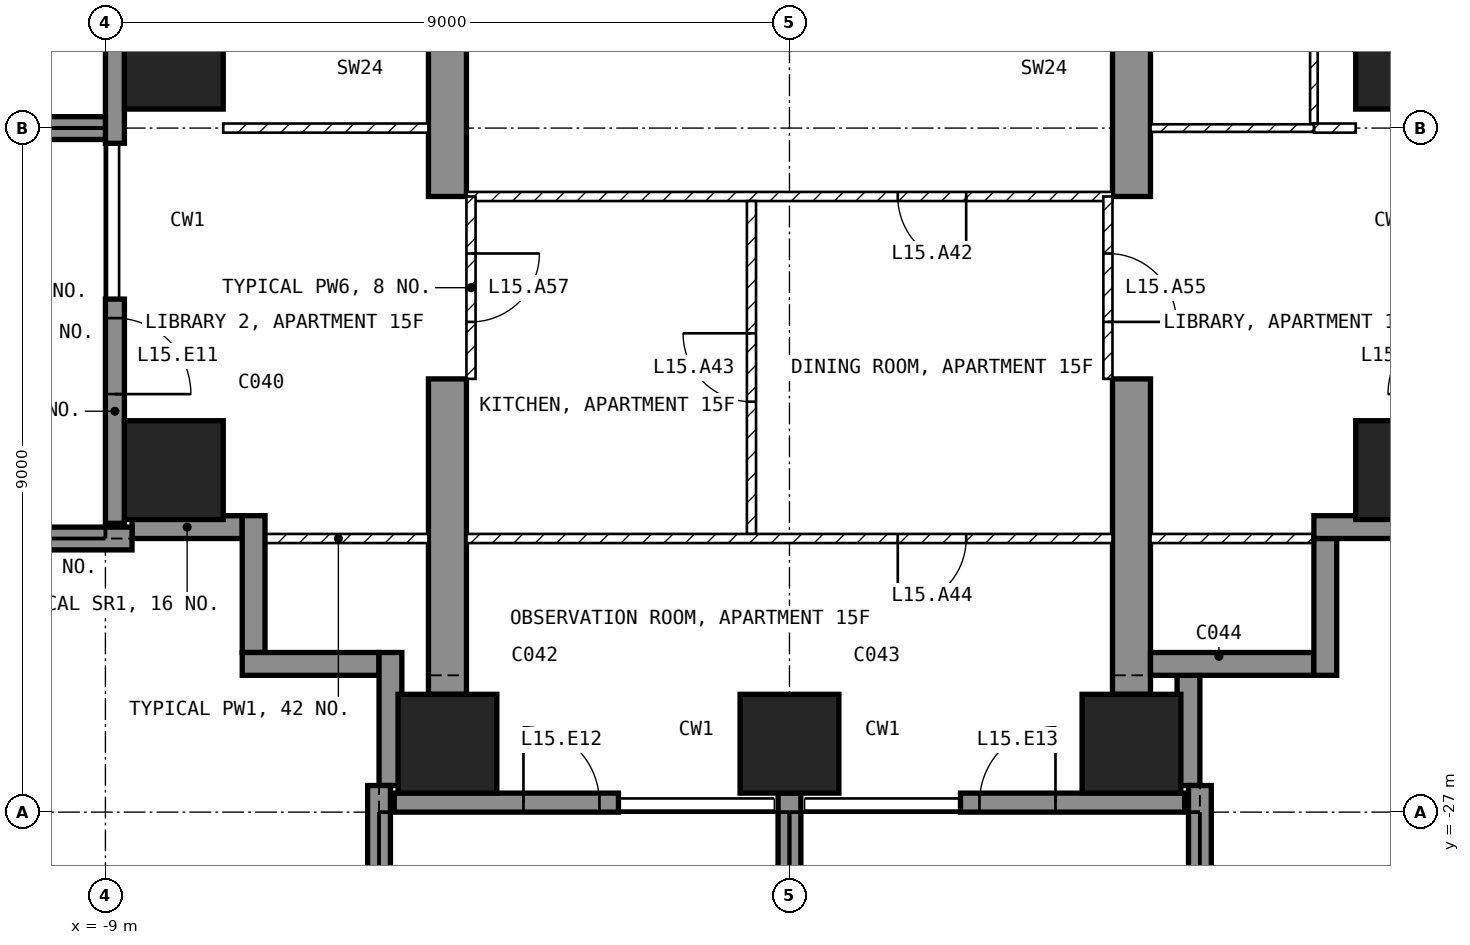
"""IFC4 building model, lengths in metres.
Left out: names, types, materials, properties, quantities, classifications, styles, units other than length and angle.
Written with IfcOpenShell. Run it as: python <this file> out.ifc"""

import sys

from ifc_helpers import new_model, si_unit, direction, frame, frame_2d, origin, origin_2d, place, context, subcontext, project, spatial, polyline, rectangle, outline, extrude, element, fill, save


model = new_model("IFC4")
c1 = context("Model", 3, precision=1e-05, world=origin(), true_north=direction((0.0, 1.0)))
c2 = subcontext(c1, "Body", "Model", "MODEL_VIEW")
j1 = project(units=[si_unit("LENGTHUNIT", "METRE"), si_unit("PLANEANGLEUNIT", "RADIAN")], contexts=[c1])
p1 = place(None, origin())
s1 = spatial("IfcSite", under=j1, at=p1, CompositionType="ELEMENT")
p2 = place(p1, origin())
s2 = spatial("IfcBuilding", under=s1, at=p2, CompositionType="ELEMENT")
p3 = place(p2, frame((0.0, 0.0, 71.5)))
s3 = spatial("IfcBuildingStorey", under=s2, at=p3, CompositionType="ELEMENT", Elevation=71.5)
for number, where, z_axis, x_axis in (
    (1, (-8.1, -22.5, -0.25), (0.0, 0.0, 1.0), (1.0, 0.0, 0.0)),
    (2, (-8.1, -17.1, -0.25), (0.0, 0.0, 1.0), (1.0, 0.0, 0.0)),
    (3, (-4.5, -26.1, -0.25), (0.0, 0.0, 1.0), (1.0, 0.0, 0.0)),
    (4, (0.0, -26.1, -0.25), (0.0, 0.0, 1.0), (1.0, 0.0, 0.0)),
    (5, (4.5, -26.1, -0.25), (0.0, 0.0, 1.0), (1.0, 0.0, 0.0)),
    (6, (8.1, -22.5, -0.25), (0.0, 0.0, 1.0), (1.0, 0.0, 0.0)),
    (7, (8.1, -17.1, -0.25), (0.0, 0.0, 1.0), (1.0, 0.0, 0.0)),
):
    element("IfcColumn", number, at=place(p3, frame(where, z_axis=z_axis, x_axis=x_axis)), inside=s3, PredefinedType="COLUMN", context=c2, shape_type="SweptSolid", body=[
        extrude(rectangle(XDim=1.3, YDim=1.3, at=origin_2d()), origin(), (0.0, 0.0, 1.0), 3.5),
    ])
for number, where, z_axis, x_axis in (
    (8, (-4.75, -25.45, -0.25), (1.0, 0.0, 0.0), (0.0, 1.0, 0.0)),
    (9, (4.25, -25.45, -0.25), (1.0, 0.0, 0.0), (0.0, 1.0, 0.0)),
):
    element("IfcWall", number, at=place(p3, frame(where, z_axis=z_axis, x_axis=x_axis)), inside=s3, PredefinedType="SHEAR", context=c2, shape_type="SweptSolid", body=[
        extrude(outline(polyline([(0.0, 0.0), (4.15, 0.0), (4.15, 2.65), (6.55, 2.65), (6.55, 0.0), (11.95, 0.0), (11.95, 2.65), (14.35, 2.65), (14.35, 0.0), (16.45, 0.0), (16.45, 3.5), (0.0, 3.5), (0.0, 0.0)])), origin(), (0.0, 0.0, 1.0), 0.5),
    ])
p4 = place(p3, frame((-8.875, -14.65, 0.0), z_axis=(0.0, 0.0, 1.0), x_axis=(0.0, -1.0, 0.0)))
e10 = element("IfcWall", 10, at=p4, inside=s3, PredefinedType="SOLIDWALL", context=c2, shape_type="SweptSolid", body=[
    extrude(rectangle(XDim=3.55, YDim=0.25, at=frame_2d((1.775, 0.0))), origin(), (0.0, 0.0, 1.0), 3.25),
])
p5 = place(p4, frame((0.25, 0.0, 0.0)))
e11 = element("IfcOpeningElement", 11, at=p5, cuts=e10, PredefinedType="OPENING", context=c2, shape_type="SweptSolid", body=[
    extrude(rectangle(XDim=1.2, YDim=2.4, at=frame_2d((0.6, 1.2))), frame((0.0, 0.135, 0.0), z_axis=(0.0, -1.0, 0.0), x_axis=(1.0, 0.0, 0.0)), (0.0, 0.0, 1.0), 0.27),
])
p6 = place(p3, frame((-8.875, -20.25, 0.0), z_axis=(0.0, 0.0, 1.0), x_axis=(0.0, -1.0, 0.0)))
e12 = element("IfcWall", 12, at=p6, inside=s3, PredefinedType="SOLIDWALL", context=c2, shape_type="SweptSolid", body=[
    extrude(rectangle(XDim=2.95, YDim=0.25, at=frame_2d((1.475, 0.0))), origin(), (0.0, 0.0, 1.0), 3.25),
])
p7 = place(p6, frame((0.25, 0.0, 0.0)))
e13 = element("IfcOpeningElement", 13, at=p7, cuts=e12, PredefinedType="OPENING", context=c2, shape_type="SweptSolid", body=[
    extrude(rectangle(XDim=1.0, YDim=2.4, at=frame_2d((0.5, 1.2))), frame((0.0, 0.135, 0.0), z_axis=(0.0, -1.0, 0.0), x_axis=(1.0, 0.0, 0.0)), (0.0, 0.0, 1.0), 0.27),
])
p8 = place(p3, frame((-5.2, -26.875, 0.0), z_axis=(0.0, 0.0, 1.0), x_axis=(1.0, 0.0, 0.0)))
e14 = element("IfcWall", 14, at=p8, inside=s3, PredefinedType="SOLIDWALL", context=c2, shape_type="SweptSolid", body=[
    extrude(rectangle(XDim=2.95, YDim=0.25, at=frame_2d((1.475, 0.0))), origin(), (0.0, 0.0, 1.0), 3.25),
])
p9 = place(p8, frame((1.7, 0.0, 0.0)))
e15 = element("IfcOpeningElement", 15, at=p9, cuts=e14, PredefinedType="OPENING", context=c2, shape_type="SweptSolid", body=[
    extrude(rectangle(XDim=1.0, YDim=2.4, at=frame_2d((0.5, 1.2))), frame((0.0, 0.135, 0.0), z_axis=(0.0, -1.0, 0.0), x_axis=(1.0, 0.0, 0.0)), (0.0, 0.0, 1.0), 0.27),
])
p10 = place(p3, frame((2.25, -26.875, 0.0), z_axis=(0.0, 0.0, 1.0), x_axis=(1.0, 0.0, 0.0)))
e16 = element("IfcWall", 16, at=p10, inside=s3, PredefinedType="SOLIDWALL", context=c2, shape_type="SweptSolid", body=[
    extrude(rectangle(XDim=2.95, YDim=0.25, at=frame_2d((1.475, 0.0))), origin(), (0.0, 0.0, 1.0), 3.25),
])
p11 = place(p10, frame((0.25, 0.0, 0.0)))
e17 = element("IfcOpeningElement", 17, at=p11, cuts=e16, PredefinedType="OPENING", context=c2, shape_type="SweptSolid", body=[
    extrude(rectangle(XDim=1.0, YDim=2.4, at=frame_2d((0.5, 1.2))), frame((0.0, 0.135, 0.0), z_axis=(0.0, -1.0, 0.0), x_axis=(1.0, 0.0, 0.0)), (0.0, 0.0, 1.0), 0.27),
])
p12 = place(p3, frame((5.25, -26.65, 0.0), z_axis=(0.0, 0.0, 1.0), x_axis=(0.0, 1.0, 0.0)))
e18 = element("IfcWall", 18, at=p12, inside=s3, PredefinedType="SOLIDWALL", context=c2, shape_type="SweptSolid", body=[
    extrude(rectangle(XDim=1.45, YDim=0.3, at=frame_2d((0.725, 0.0))), origin(), (0.0, 0.0, 1.0), 3.25),
])
p13 = place(p3, frame((4.75, -25.05, 0.0), z_axis=(0.0, 0.0, 1.0), x_axis=(1.0, 0.0, 0.0)))
e19 = element("IfcWall", 19, at=p13, inside=s3, PredefinedType="SOLIDWALL", context=c2, shape_type="SweptSolid", body=[
    extrude(rectangle(XDim=2.15, YDim=0.3, at=frame_2d((1.075, 0.0))), origin(), (0.0, 0.0, 1.0), 3.25),
])
p14 = place(p3, frame((7.05, -25.2, 0.0), z_axis=(0.0, 0.0, 1.0), x_axis=(0.0, 1.0, 0.0)))
e20 = element("IfcWall", 20, at=p14, inside=s3, PredefinedType="SOLIDWALL", context=c2, shape_type="SweptSolid", body=[
    extrude(rectangle(XDim=1.8, YDim=0.3, at=frame_2d((0.9, 0.0))), origin(), (0.0, 0.0, 1.0), 3.25),
])
p15 = place(p3, frame((6.9, -23.25, 0.0), z_axis=(0.0, 0.0, 1.0), x_axis=(1.0, 0.0, 0.0)))
e21 = element("IfcWall", 21, at=p15, inside=s3, PredefinedType="SOLIDWALL", context=c2, shape_type="SweptSolid", body=[
    extrude(rectangle(XDim=1.75, YDim=0.3, at=frame_2d((0.875, 0.0))), origin(), (0.0, 0.0, 1.0), 3.25),
])
p16 = place(p3, frame((-8.65, -23.25, 0.0), z_axis=(0.0, 0.0, 1.0), x_axis=(1.0, 0.0, 0.0)))
e22 = element("IfcWall", 22, at=p16, inside=s3, PredefinedType="SOLIDWALL", context=c2, shape_type="SweptSolid", body=[
    extrude(rectangle(XDim=1.45, YDim=0.3, at=frame_2d((0.725, 0.0))), origin(), (0.0, 0.0, 1.0), 3.25),
])
p17 = place(p3, frame((-7.05, -23.1, 0.0), z_axis=(0.0, 0.0, 1.0), x_axis=(0.0, -1.0, 0.0)))
e23 = element("IfcWall", 23, at=p17, inside=s3, PredefinedType="SOLIDWALL", context=c2, shape_type="SweptSolid", body=[
    extrude(rectangle(XDim=1.8, YDim=0.3, at=frame_2d((0.9, 0.0))), origin(), (0.0, 0.0, 1.0), 3.25),
])
p18 = place(p3, frame((-7.2, -25.05, 0.0), z_axis=(0.0, 0.0, 1.0), x_axis=(1.0, 0.0, 0.0)))
e24 = element("IfcWall", 24, at=p18, inside=s3, PredefinedType="SOLIDWALL", context=c2, shape_type="SweptSolid", body=[
    extrude(rectangle(XDim=1.8, YDim=0.3, at=frame_2d((0.9, 0.0))), origin(), (0.0, 0.0, 1.0), 3.25),
])
p19 = place(p3, frame((-5.25, -24.9, 0.0), z_axis=(0.0, 0.0, 1.0), x_axis=(0.0, -1.0, 0.0)))
e25 = element("IfcWall", 25, at=p19, inside=s3, PredefinedType="SOLIDWALL", context=c2, shape_type="SweptSolid", body=[
    extrude(rectangle(XDim=1.75, YDim=0.3, at=frame_2d((0.875, 0.0))), origin(), (0.0, 0.0, 1.0), 3.25),
])
p20 = place(p3, frame((-8.65, -23.4, 0.0), z_axis=(0.0, 0.0, 1.0), x_axis=(-1.0, 0.0, 0.0)))
e26 = element("IfcWall", 26, at=p20, inside=s3, PredefinedType="SOLIDWALL", context=c2, shape_type="SweptSolid", body=[
    extrude(rectangle(XDim=3.05, YDim=0.3, at=frame_2d((1.525, 0.0))), origin(), (0.0, 0.0, 1.0), 3.25),
])
p21 = place(p3, frame((-9.0, -18.0, 0.0), z_axis=(0.0, 0.0, 1.0), x_axis=(-1.0, 0.0, 0.0)))
e27 = element("IfcWall", 27, at=p21, inside=s3, PredefinedType="SOLIDWALL", context=c2, shape_type="SweptSolid", body=[
    extrude(rectangle(XDim=2.7, YDim=0.3, at=frame_2d((1.35, 0.0))), origin(), (0.0, 0.0, 1.0), 3.25),
])
p22 = place(p3, frame((-5.4, -26.65, 0.0), z_axis=(0.0, 0.0, 1.0), x_axis=(0.0, -1.0, 0.0)))
e28 = element("IfcWall", 28, at=p22, inside=s3, PredefinedType="SOLIDWALL", context=c2, shape_type="SweptSolid", body=[
    extrude(rectangle(XDim=3.05, YDim=0.3, at=frame_2d((1.525, 0.0))), origin(), (0.0, 0.0, 1.0), 3.25),
])
p23 = place(p3, frame((0.0, -26.75, 0.0), z_axis=(0.0, 0.0, 1.0), x_axis=(0.0, -1.0, 0.0)))
e29 = element("IfcWall", 29, at=p23, inside=s3, PredefinedType="SOLIDWALL", context=c2, shape_type="SweptSolid", body=[
    extrude(rectangle(XDim=2.95, YDim=0.3, at=frame_2d((1.475, 0.0))), origin(), (0.0, 0.0, 1.0), 3.25),
])
p24 = place(p3, frame((5.4, -26.65, 0.0), z_axis=(0.0, 0.0, 1.0), x_axis=(0.0, -1.0, 0.0)))
e30 = element("IfcWall", 30, at=p24, inside=s3, PredefinedType="SOLIDWALL", context=c2, shape_type="SweptSolid", body=[
    extrude(rectangle(XDim=3.05, YDim=0.3, at=frame_2d((1.525, 0.0))), origin(), (0.0, 0.0, 1.0), 3.25),
])
p25 = place(p3, frame((4.25, -18.9, 0.0), z_axis=(0.0, 0.0, 1.0), x_axis=(-1.0, 0.0, 0.0)))
e31 = element("IfcWall", 31, at=p25, inside=s3, PredefinedType="PARTITIONING", context=c2, shape_type="SweptSolid", body=[
    extrude(rectangle(XDim=8.5, YDim=0.12, at=frame_2d((4.25, 0.0))), origin(), (0.0, 0.0, 1.0), 3.25),
])
p26 = place(p25, frame((1.925, 0.0, 0.0)))
e32 = element("IfcOpeningElement", 32, at=p26, cuts=e31, PredefinedType="OPENING", context=c2, shape_type="SweptSolid", body=[
    extrude(rectangle(XDim=0.9, YDim=2.1, at=frame_2d((0.45, 1.05))), frame((0.0, 0.07, 0.0), z_axis=(0.0, -1.0, 0.0), x_axis=(1.0, 0.0, 0.0)), (0.0, 0.0, 1.0), 0.14),
])
p27 = place(p3, frame((-0.5, -23.34, 0.0), z_axis=(0.0, 0.0, 1.0), x_axis=(0.0, 1.0, 0.0)))
e33 = element("IfcWall", 33, at=p27, inside=s3, PredefinedType="PARTITIONING", context=c2, shape_type="SweptSolid", body=[
    extrude(rectangle(XDim=4.38, YDim=0.12, at=frame_2d((2.19, 0.0))), origin(), (0.0, 0.0, 1.0), 3.25),
])
p28 = place(p27, frame((1.74, 0.0, 0.0)))
e34 = element("IfcOpeningElement", 34, at=p28, cuts=e33, PredefinedType="OPENING", context=c2, shape_type="SweptSolid", body=[
    extrude(rectangle(XDim=0.9, YDim=2.1, at=frame_2d((0.45, 1.05))), frame((0.0, 0.07, 0.0), z_axis=(0.0, -1.0, 0.0), x_axis=(1.0, 0.0, 0.0)), (0.0, 0.0, 1.0), 0.14),
])
p29 = place(p3, frame((4.25, -23.4, 0.0), z_axis=(0.0, 0.0, 1.0), x_axis=(-1.0, 0.0, 0.0)))
e35 = element("IfcWall", 35, at=p29, inside=s3, PredefinedType="PARTITIONING", context=c2, shape_type="SweptSolid", body=[
    extrude(rectangle(XDim=8.5, YDim=0.12, at=frame_2d((4.25, 0.0))), origin(), (0.0, 0.0, 1.0), 3.25),
])
p30 = place(p29, frame((1.925, 0.0, 0.0)))
e36 = element("IfcOpeningElement", 36, at=p30, cuts=e35, PredefinedType="OPENING", context=c2, shape_type="SweptSolid", body=[
    extrude(rectangle(XDim=0.9, YDim=2.1, at=frame_2d((0.45, 1.05))), frame((0.0, 0.07, 0.0), z_axis=(0.0, -1.0, 0.0), x_axis=(1.0, 0.0, 0.0)), (0.0, 0.0, 1.0), 0.14),
])
p31 = place(p3, frame((6.9, -17.94, 0.0), z_axis=(0.0, 0.0, 1.0), x_axis=(0.0, 1.0, 0.0)))
e37 = element("IfcWall", 37, at=p31, inside=s3, PredefinedType="PARTITIONING", context=c2, shape_type="SweptSolid", body=[
    extrude(rectangle(XDim=3.49, YDim=0.1, at=frame_2d((1.745, 0.0))), origin(), (0.0, 0.0, 1.0), 3.25),
])
p32 = place(p3, frame((7.45, -18.0, 0.0), z_axis=(0.0, 0.0, 1.0), x_axis=(-1.0, 0.0, 0.0)))
e38 = element("IfcWall", 38, at=p32, inside=s3, PredefinedType="PARTITIONING", context=c2, shape_type="SweptSolid", body=[
    extrude(rectangle(XDim=0.55, YDim=0.12, at=frame_2d((0.275, 0.0))), origin(), (0.0, 0.0, 1.0), 3.25),
])
p33 = place(p3, frame((6.9, -18.0, 0.0), z_axis=(0.0, 0.0, 1.0), x_axis=(-1.0, 0.0, 0.0)))
e39 = element("IfcWall", 39, at=p33, inside=s3, PredefinedType="PARTITIONING", context=c2, shape_type="SweptSolid", body=[
    extrude(rectangle(XDim=2.15, YDim=0.1, at=frame_2d((1.075, 0.0))), origin(), (0.0, 0.0, 1.0), 3.25),
])
p34 = place(p3, frame((7.12, -23.4, 0.0), z_axis=(0.0, 0.0, 1.0), x_axis=(-1.0, 0.0, 0.0)))
e40 = element("IfcWall", 40, at=p34, inside=s3, PredefinedType="PARTITIONING", context=c2, shape_type="SweptSolid", body=[
    extrude(rectangle(XDim=2.37, YDim=0.12, at=frame_2d((1.185, 0.0))), origin(), (0.0, 0.0, 1.0), 3.25),
])
p35 = place(p3, frame((-4.75, -18.0, 0.0), z_axis=(0.0, 0.0, 1.0), x_axis=(-1.0, 0.0, 0.0)))
e41 = element("IfcWall", 41, at=p35, inside=s3, PredefinedType="PARTITIONING", context=c2, shape_type="SweptSolid", body=[
    extrude(rectangle(XDim=2.7, YDim=0.12, at=frame_2d((1.35, 0.0))), origin(), (0.0, 0.0, 1.0), 3.25),
])
p36 = place(p3, frame((-4.75, -23.4, 0.0), z_axis=(0.0, 0.0, 1.0), x_axis=(-1.0, 0.0, 0.0)))
e42 = element("IfcWall", 42, at=p36, inside=s3, PredefinedType="PARTITIONING", context=c2, shape_type="SweptSolid", body=[
    extrude(rectangle(XDim=2.37, YDim=0.12, at=frame_2d((1.185, 0.0))), origin(), (0.0, 0.0, 1.0), 3.25),
])
p37 = place(p3, frame((4.19, -18.9, 0.0), z_axis=(0.0, 0.0, 1.0), x_axis=(0.0, -1.0, 0.0)))
e43 = element("IfcWall", 43, at=p37, inside=s3, PredefinedType="PARTITIONING", context=c2, shape_type="SweptSolid", body=[
    extrude(rectangle(XDim=2.4, YDim=0.12, at=frame_2d((1.2, 0.0))), origin(), (0.0, 0.0, 1.0), 2.4),
])
p38 = place(p37, frame((0.75, 0.0, 0.0)))
e44 = element("IfcOpeningElement", 44, at=p38, cuts=e43, PredefinedType="OPENING", context=c2, shape_type="SweptSolid", body=[
    extrude(rectangle(XDim=0.9, YDim=2.1, at=frame_2d((0.45, 1.05))), frame((0.0, 0.07, 0.0), z_axis=(0.0, -1.0, 0.0), x_axis=(1.0, 0.0, 0.0)), (0.0, 0.0, 1.0), 0.14),
])
p39 = place(p3, frame((-4.19, -18.9, 0.0), z_axis=(0.0, 0.0, 1.0), x_axis=(0.0, -1.0, 0.0)))
e45 = element("IfcWall", 45, at=p39, inside=s3, PredefinedType="PARTITIONING", context=c2, shape_type="SweptSolid", body=[
    extrude(rectangle(XDim=2.4, YDim=0.12, at=frame_2d((1.2, 0.0))), origin(), (0.0, 0.0, 1.0), 2.4),
])
p40 = place(p39, frame((0.75, 0.0, 0.0)))
e46 = element("IfcOpeningElement", 46, at=p40, cuts=e45, PredefinedType="OPENING", context=c2, shape_type="SweptSolid", body=[
    extrude(rectangle(XDim=0.9, YDim=2.1, at=frame_2d((0.45, 1.05))), frame((0.0, 0.07, 0.0), z_axis=(0.0, -1.0, 0.0), x_axis=(1.0, 0.0, 0.0)), (0.0, 0.0, 1.0), 0.14),
])
p41 = place(p7, origin())
e47 = element("IfcDoor", 47, at=p41, inside=s3, OperationType="SINGLE_SWING_RIGHT", PredefinedType="DOOR", context=c2, shape_type="SweptSolid", body=[
    extrude(rectangle(XDim=1.0, YDim=2.4, at=frame_2d((0.5, 1.2))), frame((0.0, 0.025, 0.0), z_axis=(0.0, -1.0, 0.0), x_axis=(1.0, 0.0, 0.0)), (0.0, 0.0, 1.0), 0.05),
])
fill(e13, e47)
p42 = place(p9, origin())
e48 = element("IfcDoor", 48, at=p42, inside=s3, OperationType="SINGLE_SWING_LEFT", PredefinedType="DOOR", context=c2, shape_type="SweptSolid", body=[
    extrude(rectangle(XDim=1.0, YDim=2.4, at=frame_2d((0.5, 1.2))), frame((0.0, 0.025, 0.0), z_axis=(0.0, -1.0, 0.0), x_axis=(1.0, 0.0, 0.0)), (0.0, 0.0, 1.0), 0.05),
])
fill(e15, e48)
p43 = place(p11, origin())
e49 = element("IfcDoor", 49, at=p43, inside=s3, OperationType="SINGLE_SWING_RIGHT", PredefinedType="DOOR", context=c2, shape_type="SweptSolid", body=[
    extrude(rectangle(XDim=1.0, YDim=2.4, at=frame_2d((0.5, 1.2))), frame((0.0, 0.025, 0.0), z_axis=(0.0, -1.0, 0.0), x_axis=(1.0, 0.0, 0.0)), (0.0, 0.0, 1.0), 0.05),
])
fill(e17, e49)
p44 = place(p26, origin())
e50 = element("IfcDoor", 50, at=p44, inside=s3, OperationType="SINGLE_SWING_LEFT", PredefinedType="DOOR", context=c2, shape_type="SweptSolid", body=[
    extrude(rectangle(XDim=0.9, YDim=2.1, at=frame_2d((0.45, 1.05))), frame((0.0, 0.025, 0.0), z_axis=(0.0, -1.0, 0.0), x_axis=(1.0, 0.0, 0.0)), (0.0, 0.0, 1.0), 0.05),
])
fill(e32, e50)
p45 = place(p28, origin())
e51 = element("IfcDoor", 51, at=p45, inside=s3, OperationType="SINGLE_SWING_RIGHT", PredefinedType="DOOR", context=c2, shape_type="SweptSolid", body=[
    extrude(rectangle(XDim=0.9, YDim=2.1, at=frame_2d((0.45, 1.05))), frame((0.0, 0.025, 0.0), z_axis=(0.0, -1.0, 0.0), x_axis=(1.0, 0.0, 0.0)), (0.0, 0.0, 1.0), 0.05),
])
fill(e34, e51)
p46 = place(p30, origin())
e52 = element("IfcDoor", 52, at=p46, inside=s3, OperationType="SINGLE_SWING_RIGHT", PredefinedType="DOOR", context=c2, shape_type="SweptSolid", body=[
    extrude(rectangle(XDim=0.9, YDim=2.1, at=frame_2d((0.45, 1.05))), frame((0.0, 0.025, 0.0), z_axis=(0.0, -1.0, 0.0), x_axis=(1.0, 0.0, 0.0)), (0.0, 0.0, 1.0), 0.05),
])
fill(e36, e52)
p47 = place(p38, origin())
e53 = element("IfcDoor", 53, at=p47, inside=s3, OperationType="SINGLE_SWING_RIGHT", PredefinedType="DOOR", context=c2, shape_type="SweptSolid", body=[
    extrude(rectangle(XDim=0.9, YDim=2.1, at=frame_2d((0.45, 1.05))), frame((0.0, 0.025, 0.0), z_axis=(0.0, -1.0, 0.0), x_axis=(1.0, 0.0, 0.0)), (0.0, 0.0, 1.0), 0.05),
])
fill(e44, e53)
p48 = place(p40, origin())
e54 = element("IfcDoor", 54, at=p48, inside=s3, OperationType="SINGLE_SWING_LEFT", PredefinedType="DOOR", context=c2, shape_type="SweptSolid", body=[
    extrude(rectangle(XDim=0.9, YDim=2.1, at=frame_2d((0.45, 1.05))), frame((0.0, 0.025, 0.0), z_axis=(0.0, -1.0, 0.0), x_axis=(1.0, 0.0, 0.0)), (0.0, 0.0, 1.0), 0.05),
])
fill(e46, e54)
save(model, sys.argv[1])
